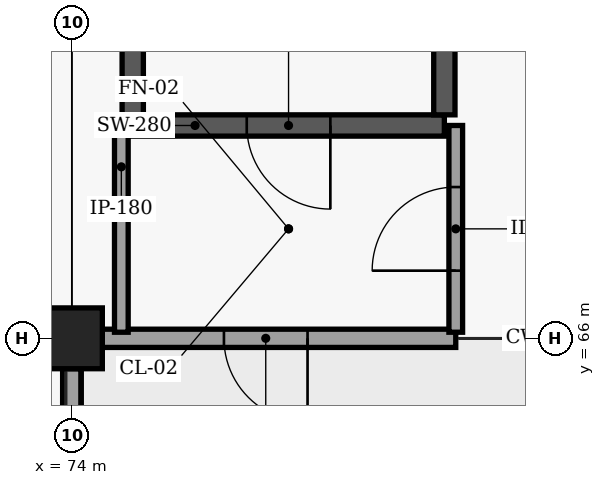
"""IFC4 building model, lengths in metres.
Left out: names, types, materials, properties, quantities, classifications, styles, units other than length and angle.
Written with IfcOpenShell. Run it as: python <this file> out.ifc"""

import sys

from ifc_helpers import new_model, si_unit, direction, frame, frame_2d, origin, origin_2d, place, context, subcontext, project, spatial, rectangle, extrude, element, fill, save


model = new_model("IFC4")
c1 = context("Model", 3, precision=1e-05, world=origin(), true_north=direction((0.0, 1.0)))
c2 = subcontext(c1, "Body", "Model", "MODEL_VIEW")
j1 = project(units=[si_unit("LENGTHUNIT", "METRE"), si_unit("PLANEANGLEUNIT", "RADIAN")], contexts=[c1])
p1 = place(None, origin())
s1 = spatial("IfcSite", under=j1, at=p1, CompositionType="ELEMENT")
p2 = place(p1, origin())
s2 = spatial("IfcBuilding", under=s1, at=p2, CompositionType="ELEMENT")
p3 = place(p2, origin())
s3 = spatial("IfcBuildingStorey", under=s2, at=p3, CompositionType="ELEMENT", Elevation=0.0)
p4 = place(p3, frame((74.0, 66.0, -0.45), z_axis=(0.0, 0.0, 1.0), x_axis=(1.0, 0.0, 0.0)))
e1 = element("IfcColumn", 1, at=p4, inside=s3, PredefinedType="COLUMN", context=c2, shape_type="SweptSolid", body=[
    extrude(rectangle(XDim=0.8, YDim=0.8, at=origin_2d()), origin(), (0.0, 0.0, 1.0), 5.57),
])
p5 = place(p3, frame((78.9, 68.8, -0.45), z_axis=(0.0, 0.0, 1.0), x_axis=(-1.0, 0.0, 0.0)))
e2 = element("IfcWall", 2, at=p5, inside=s3, PredefinedType="SHEAR", context=c2, shape_type="SweptSolid", body=[
    extrude(rectangle(XDim=4.1, YDim=0.28, at=frame_2d((2.05, 0.0))), origin(), (0.0, 0.0, 1.0), 5.57),
])
p6 = place(p5, frame((1.5, 0.0, 0.45)))
e3 = element("IfcOpeningElement", 3, at=p6, cuts=e2, PredefinedType="OPENING", context=c2, shape_type="SweptSolid", body=[
    extrude(rectangle(XDim=1.1, YDim=2.2, at=frame_2d((0.55, 1.1))), frame((0.0, 0.15, 0.0), z_axis=(0.0, -1.0, 0.0), x_axis=(1.0, 0.0, 0.0)), (0.0, 0.0, 1.0), 0.3),
])
for number, where, z_axis, x_axis in (
    (4, (74.8, 68.94, -0.45), (0.0, 0.0, 1.0), (0.0, 1.0, 0.0)),
    (5, (78.9, 68.94, -0.45), (0.0, 0.0, 1.0), (0.0, 1.0, 0.0)),
):
    element("IfcWall", number, at=place(p3, frame(where, z_axis=z_axis, x_axis=x_axis)), inside=s3, PredefinedType="SHEAR", context=c2, shape_type="SweptSolid", body=[
        extrude(rectangle(XDim=8.72, YDim=0.28, at=frame_2d((4.36, 0.0))), origin(), (0.0, 0.0, 1.0), 5.57),
    ])
p7 = place(p3, frame((74.0, 54.4, 1.88), z_axis=(0.0, 0.0, 1.0), x_axis=(0.0, 1.0, 0.0)))
e6 = element("IfcWall", 6, at=p7, inside=s3, PredefinedType="SOLIDWALL", context=c2, shape_type="SweptSolid", body=[
    extrude(rectangle(XDim=11.2, YDim=0.245, at=frame_2d((5.6, 0.0))), origin(), (0.0, 0.0, 1.0), 0.22),
])
p8 = place(p3, frame((74.0, 64.15, 1.38), z_axis=(0.0, 0.0, 1.0), x_axis=(0.0, 1.0, 0.0)))
e7 = element("IfcWall", 7, at=p8, inside=s3, PredefinedType="SOLIDWALL", context=c2, shape_type="SweptSolid", body=[
    extrude(rectangle(XDim=1.45, YDim=0.235, at=frame_2d((0.725, 0.0))), origin(), (0.0, 0.0, 1.0), 0.5),
])
p9 = place(p3, frame((79.05, 66.0, 0.0), z_axis=(0.0, 0.0, 1.0), x_axis=(-1.0, 0.0, 0.0)))
e8 = element("IfcWall", 8, at=p9, inside=s3, PredefinedType="ELEMENTEDWALL", context=c2, shape_type="SweptSolid", body=[
    extrude(rectangle(XDim=4.7, YDim=0.24, at=frame_2d((2.35, 0.0))), origin(), (0.0, 0.0, 1.0), 4.658),
])
p10 = place(p9, frame((1.95, 0.0, 0.0)))
e9 = element("IfcOpeningElement", 9, at=p10, cuts=e8, PredefinedType="OPENING", context=c2, shape_type="SweptSolid", body=[
    extrude(rectangle(XDim=1.1, YDim=2.2, at=frame_2d((0.55, 1.1))), frame((0.0, 0.13, 0.0), z_axis=(0.0, -1.0, 0.0), x_axis=(1.0, 0.0, 0.0)), (0.0, 0.0, 1.0), 0.26),
])
p11 = place(p3, frame((74.65, 66.08, 0.0), z_axis=(0.0, 0.0, 1.0), x_axis=(0.0, 1.0, 0.0)))
e10 = element("IfcWall", 10, at=p11, inside=s3, PredefinedType="SOLIDWALL", context=c2, shape_type="SweptSolid", body=[
    extrude(rectangle(XDim=2.72, YDim=0.18, at=frame_2d((1.36, 0.0))), origin(), (0.0, 0.0, 1.0), 5.1),
])
p12 = place(p3, frame((79.05, 66.08, 0.0), z_axis=(0.0, 0.0, 1.0), x_axis=(0.0, 1.0, 0.0)))
e11 = element("IfcWall", 11, at=p12, inside=s3, PredefinedType="SOLIDWALL", context=c2, shape_type="SweptSolid", body=[
    extrude(rectangle(XDim=2.72, YDim=0.18, at=frame_2d((1.36, 0.0))), origin(), (0.0, 0.0, 1.0), 5.1),
])
p13 = place(p12, frame((0.81, 0.0, 0.0)))
e12 = element("IfcOpeningElement", 12, at=p13, cuts=e11, PredefinedType="OPENING", context=c2, shape_type="SweptSolid", body=[
    extrude(rectangle(XDim=1.1, YDim=2.2, at=frame_2d((0.55, 1.1))), frame((0.0, 0.1, 0.0), z_axis=(0.0, -1.0, 0.0), x_axis=(1.0, 0.0, 0.0)), (0.0, 0.0, 1.0), 0.2),
])
p14 = place(p6, origin())
e13 = element("IfcDoor", 13, at=p14, inside=s3, OperationType="SINGLE_SWING_LEFT", PredefinedType="DOOR", context=c2, shape_type="SweptSolid", body=[
    extrude(rectangle(XDim=1.1, YDim=2.2, at=frame_2d((0.55, 1.1))), frame((0.0, 0.025, 0.0), z_axis=(0.0, -1.0, 0.0), x_axis=(1.0, 0.0, 0.0)), (0.0, 0.0, 1.0), 0.05),
])
fill(e3, e13)
p15 = place(p10, origin())
e14 = element("IfcDoor", 14, at=p15, inside=s3, OperationType="SINGLE_SWING_LEFT", PredefinedType="DOOR", context=c2, shape_type="SweptSolid", body=[
    extrude(rectangle(XDim=1.1, YDim=2.2, at=frame_2d((0.55, 1.1))), frame((0.0, 0.025, 0.0), z_axis=(0.0, -1.0, 0.0), x_axis=(1.0, 0.0, 0.0)), (0.0, 0.0, 1.0), 0.05),
])
fill(e9, e14)
p16 = place(p13, origin())
e15 = element("IfcDoor", 15, at=p16, inside=s3, OperationType="SINGLE_SWING_LEFT", PredefinedType="DOOR", context=c2, shape_type="SweptSolid", body=[
    extrude(rectangle(XDim=1.1, YDim=2.2, at=frame_2d((0.55, 1.1))), frame((0.0, 0.025, 0.0), z_axis=(0.0, -1.0, 0.0), x_axis=(1.0, 0.0, 0.0)), (0.0, 0.0, 1.0), 0.05),
])
fill(e12, e15)
save(model, sys.argv[1])
